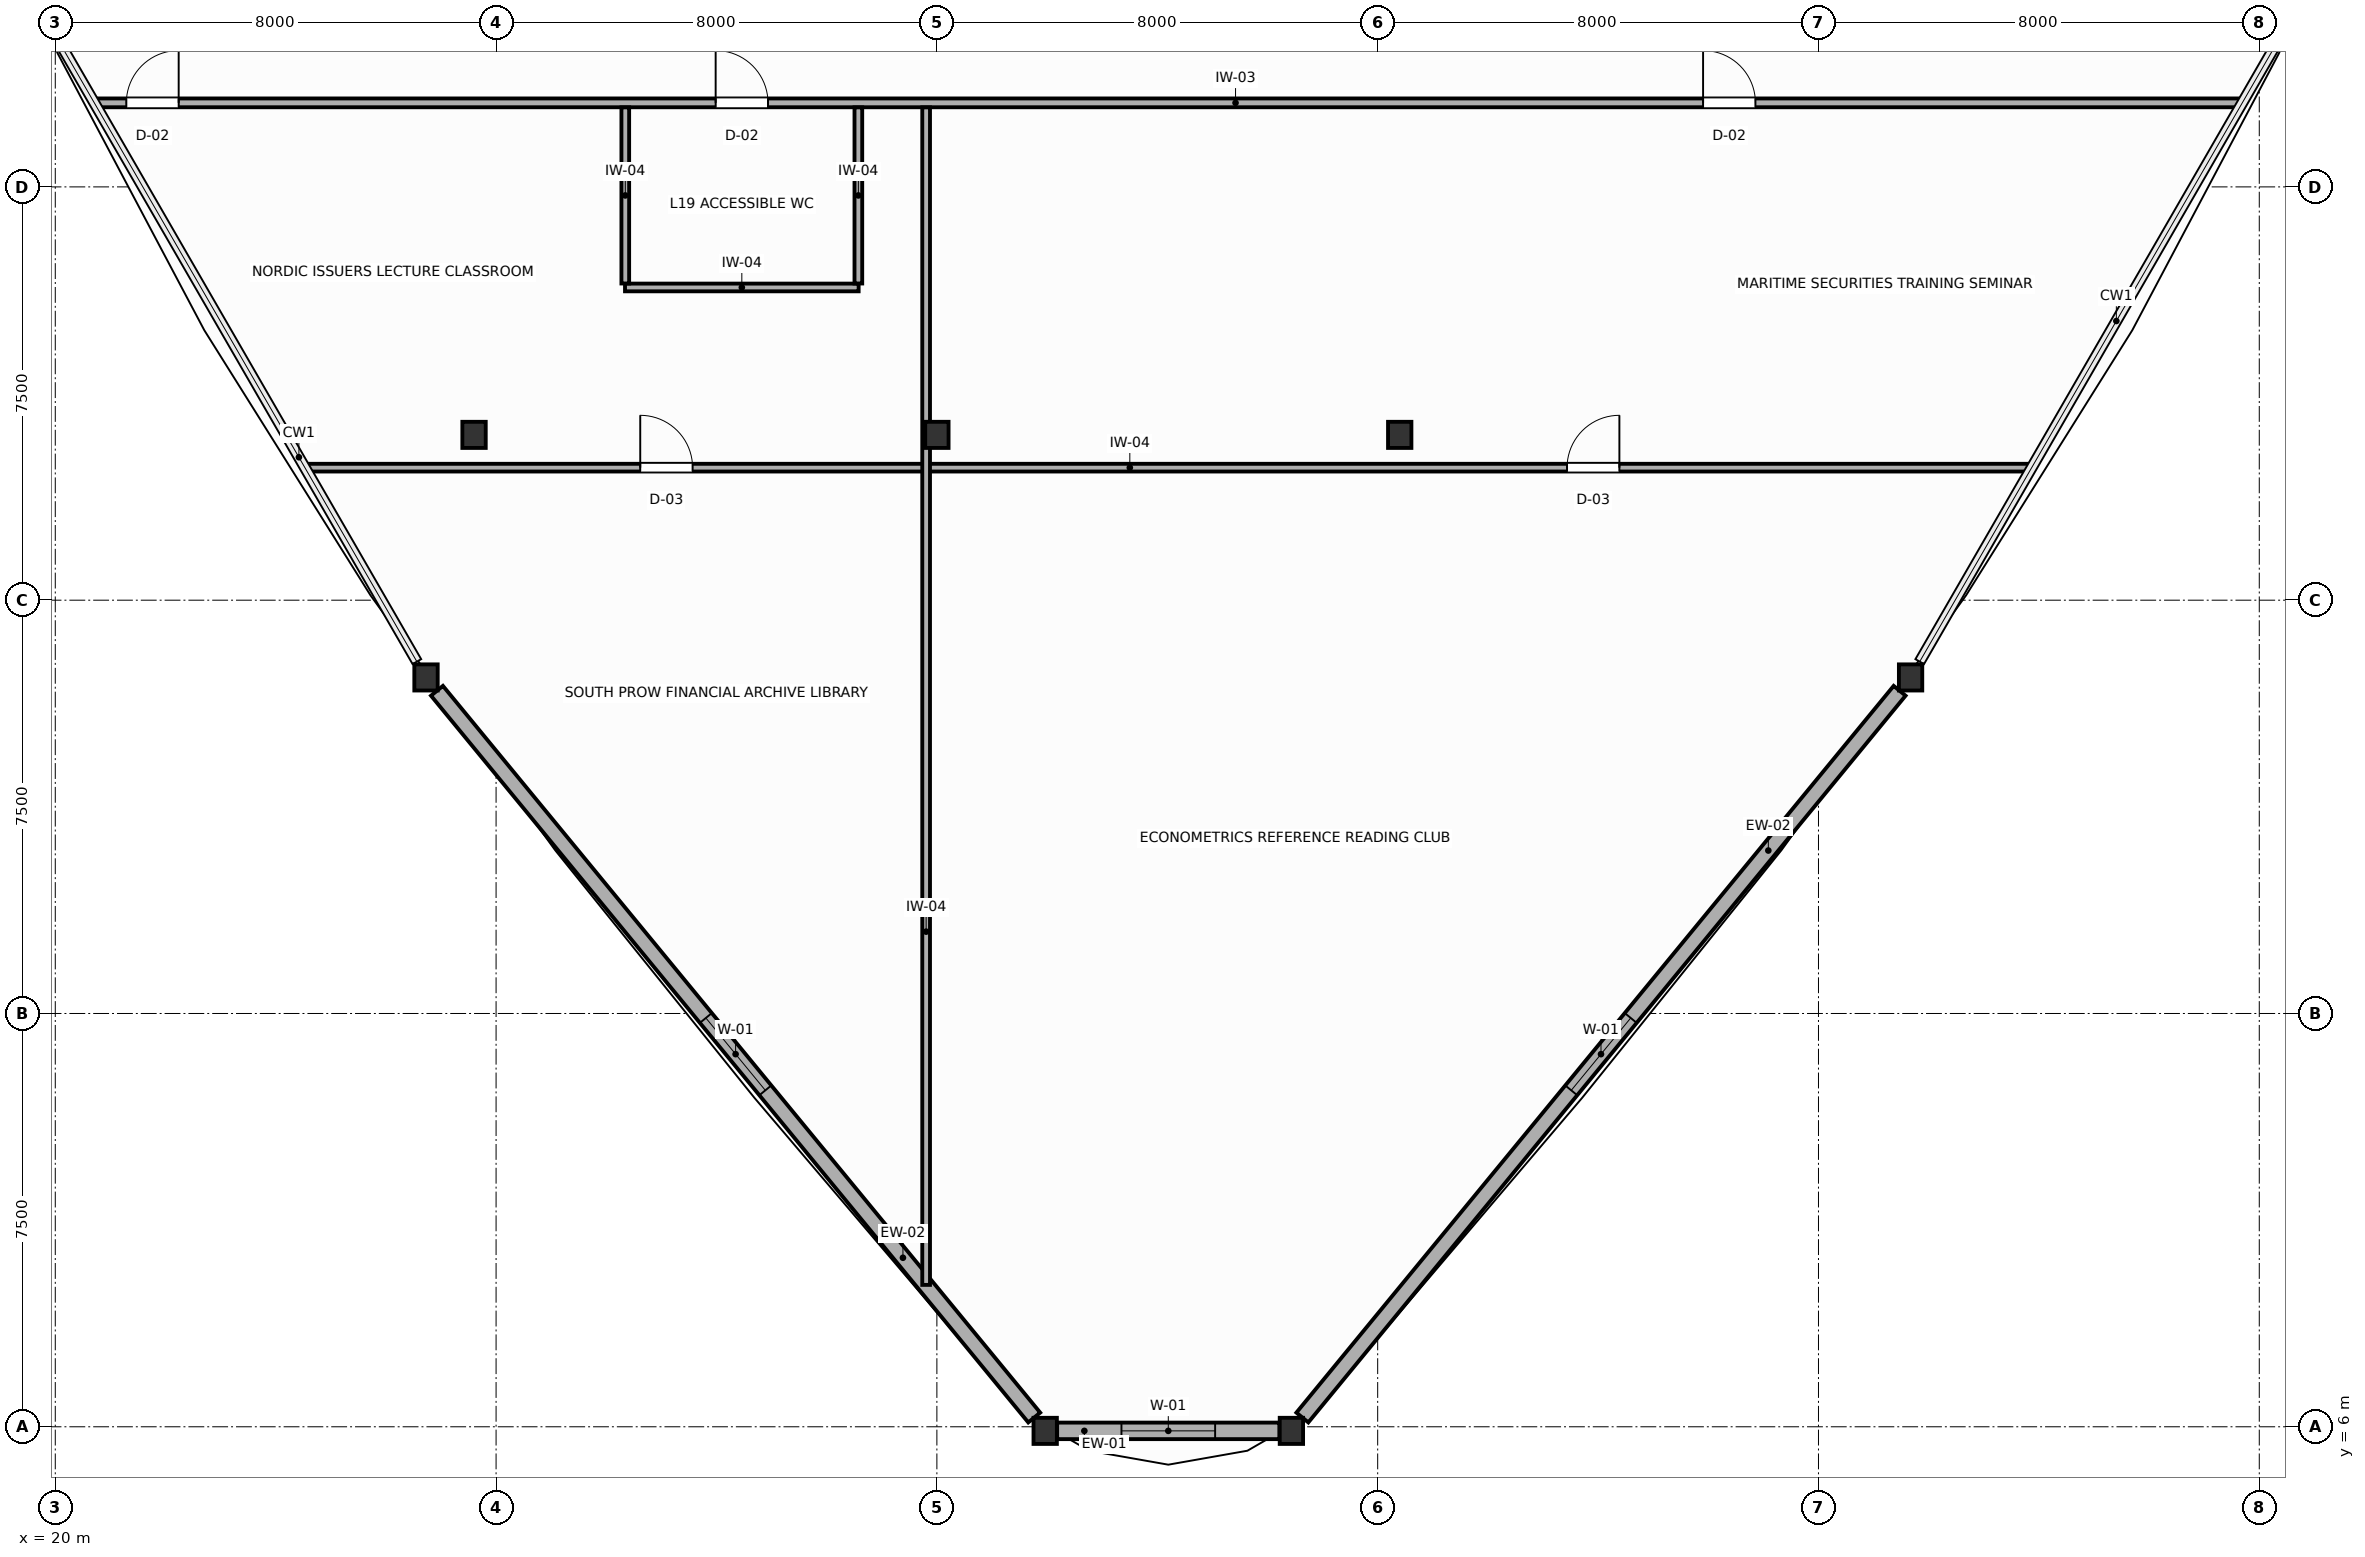
"""IFC4 building model, lengths in metres.
Left out: names, types, materials, properties, quantities, classifications, styles, units other than length and angle.
Written with IfcOpenShell. Run it as: python <this file> out.ifc"""

import sys

from ifc_helpers import new_model, si_unit, direction, frame, frame_2d, origin, origin_2d, place, context, subcontext, project, spatial, rectangle, i_section, extrude, source, transform, mapped, element, fill, save


model = new_model("IFC4")
c1 = context("Model", 3, precision=1e-05, world=origin(), true_north=direction((0.0, 1.0)))
c2 = subcontext(c1, "Body", "Model", "MODEL_VIEW")
j1 = project(units=[si_unit("LENGTHUNIT", "METRE"), si_unit("PLANEANGLEUNIT", "RADIAN")], contexts=[c1])
p1 = place(None, origin())
s1 = spatial("IfcSite", under=j1, at=p1, CompositionType="ELEMENT")
p2 = place(p1, origin())
s2 = spatial("IfcBuilding", under=s1, at=p2, CompositionType="ELEMENT")
p3 = place(p2, frame((0.0, 0.0, 79.5)))
s3 = spatial("IfcBuildingStorey", under=s2, at=p3, CompositionType="ELEMENT", Elevation=79.5)
m1 = source(origin(), c2, "Body", "SweptSolid", [
    extrude(i_section(OverallWidth=0.424, OverallDepth=0.474, WebThickness=0.045, FlangeThickness=0.072, FilletRadius=0.015, at=origin_2d()), origin(), (0.0, 0.0, 1.0), 3.9),
])
for number, where, z_axis, x_axis in (
    (1, (27.6, 24.0, 0.0), (0.0, 0.0, 1.0), (1.0, 0.0, 0.0)),
    (2, (44.4, 24.0, 0.0), (0.0, 0.0, 1.0), (1.0, 0.0, 0.0)),
    (3, (36.0, 24.0, 0.0), (0.0, 0.0, 1.0), (1.0, 0.0, 0.0)),
    (4, (26.729, 19.598, 0.0), (0.0, 0.0, 1.0), (1.0, 0.0, 0.0)),
    (5, (37.966, 5.926, 0.0), (0.0, 0.0, 1.0), (1.0, 0.0, 0.0)),
    (6, (42.434, 5.926, 0.0), (0.0, 0.0, 1.0), (1.0, 0.0, 0.0)),
    (7, (53.672, 19.598, 0.0), (0.0, 0.0, 1.0), (1.0, 0.0, 0.0)),
):
    element("IfcColumn", number, at=place(p3, frame(where, z_axis=z_axis, x_axis=x_axis)), inside=s3, PredefinedType="COLUMN", context=c2, shape_type="MappedRepresentation", body=[
        mapped(m1, transform((0.0, 0.0, 0.0), scale=1.0)),
    ])
p4 = place(p3, frame((26.927, 19.356, 0.0), z_axis=(0.0, 0.0, 1.0), x_axis=(0.634956540438, -0.772547857259, 0.0)))
e8 = element("IfcWall", 8, at=p4, inside=s3, PredefinedType="SOLIDWALL", context=c2, shape_type="SweptSolid", body=[
    extrude(rectangle(XDim=17.071, YDim=0.28, at=frame_2d((8.536, 0.0))), origin(), (0.0, 0.0, 1.0), 3.23),
])
p5 = place(p4, frame((7.686, 0.0, 0.75)))
e9 = element("IfcOpeningElement", 9, at=p5, cuts=e8, PredefinedType="OPENING", context=c2, shape_type="SweptSolid", body=[
    extrude(rectangle(XDim=1.7, YDim=1.75, at=frame_2d((0.85, 0.875))), frame((0.0, 0.15, 0.0), z_axis=(0.0, -1.0, 0.0), x_axis=(1.0, 0.0, 0.0)), (0.0, 0.0, 1.0), 0.3),
])
p6 = place(p3, frame((38.183, 5.926, 0.0), z_axis=(0.0, 0.0, 1.0), x_axis=(1.0, 0.0, 0.0)))
e10 = element("IfcWall", 10, at=p6, inside=s3, PredefinedType="SOLIDWALL", context=c2, shape_type="SweptSolid", body=[
    extrude(rectangle(XDim=4.034, YDim=0.3, at=frame_2d((2.017, 0.0))), origin(), (0.0, 0.0, 1.0), 3.23),
])
p7 = place(p6, frame((1.167, 0.0, 0.75)))
e11 = element("IfcOpeningElement", 11, at=p7, cuts=e10, PredefinedType="OPENING", context=c2, shape_type="SweptSolid", body=[
    extrude(rectangle(XDim=1.7, YDim=1.75, at=frame_2d((0.85, 0.875))), frame((0.0, 0.16, 0.0), z_axis=(0.0, -1.0, 0.0), x_axis=(1.0, 0.0, 0.0)), (0.0, 0.0, 1.0), 0.32),
])
p8 = place(p3, frame((42.633, 6.168, 0.0), z_axis=(0.0, 0.0, 1.0), x_axis=(0.634956540438, 0.772547857259, 0.0)))
e12 = element("IfcWall", 12, at=p8, inside=s3, PredefinedType="SOLIDWALL", context=c2, shape_type="SweptSolid", body=[
    extrude(rectangle(XDim=17.071, YDim=0.28, at=frame_2d((8.536, 0.0))), origin(), (0.0, 0.0, 1.0), 3.23),
])
p9 = place(p8, frame((7.686, 0.0, 0.75)))
e13 = element("IfcOpeningElement", 13, at=p9, cuts=e12, PredefinedType="OPENING", context=c2, shape_type="SweptSolid", body=[
    extrude(rectangle(XDim=1.7, YDim=1.75, at=frame_2d((0.85, 0.875))), frame((0.0, 0.15, 0.0), z_axis=(0.0, -1.0, 0.0), x_axis=(1.0, 0.0, 0.0)), (0.0, 0.0, 1.0), 0.3),
])
p10 = place(p3, frame((20.729, 30.025, 0.0), z_axis=(0.0, 0.0, 1.0), x_axis=(1.0, 0.0, 0.0)))
e14 = element("IfcWall", 14, at=p10, inside=s3, PredefinedType="PARTITIONING", context=c2, shape_type="SweptSolid", body=[
    extrude(rectangle(XDim=38.943, YDim=0.16, at=frame_2d((19.472, 0.0))), origin(), (0.0, 0.0, 1.0), 3.68),
])
p11 = place(p10, frame((11.257, 0.0, 0.0)))
e15 = element("IfcOpeningElement", 15, at=p11, cuts=e14, PredefinedType="OPENING", context=c2, shape_type="SweptSolid", body=[
    extrude(rectangle(XDim=0.95, YDim=2.05, at=frame_2d((0.475, 1.025))), frame((0.0, 0.09, 0.0), z_axis=(0.0, -1.0, 0.0), x_axis=(1.0, 0.0, 0.0)), (0.0, 0.0, 1.0), 0.18),
])
p12 = place(p10, frame((0.561, 0.0, 0.0)))
e16 = element("IfcOpeningElement", 16, at=p12, cuts=e14, PredefinedType="OPENING", context=c2, shape_type="SweptSolid", body=[
    extrude(rectangle(XDim=0.95, YDim=2.05, at=frame_2d((0.475, 1.025))), frame((0.0, 0.09, 0.0), z_axis=(0.0, -1.0, 0.0), x_axis=(1.0, 0.0, 0.0)), (0.0, 0.0, 1.0), 0.18),
])
p13 = place(p10, frame((29.177, 0.0, 0.0)))
e17 = element("IfcOpeningElement", 17, at=p13, cuts=e14, PredefinedType="OPENING", context=c2, shape_type="SweptSolid", body=[
    extrude(rectangle(XDim=0.95, YDim=2.05, at=frame_2d((0.475, 1.025))), frame((0.0, 0.09, 0.0), z_axis=(0.0, -1.0, 0.0), x_axis=(1.0, 0.0, 0.0)), (0.0, 0.0, 1.0), 0.18),
])
p14 = place(p3, frame((24.551, 23.405, 0.0), z_axis=(0.0, 0.0, 1.0), x_axis=(1.0, 0.0, 0.0)))
e18 = element("IfcWall", 18, at=p14, inside=s3, PredefinedType="PARTITIONING", context=c2, shape_type="SweptSolid", body=[
    extrude(rectangle(XDim=31.299, YDim=0.14, at=frame_2d((15.649, 0.0))), origin(), (0.0, 0.0, 1.0), 3.68),
])
p15 = place(p14, frame((6.066, 0.0, 0.0)))
e19 = element("IfcOpeningElement", 19, at=p15, cuts=e18, PredefinedType="OPENING", context=c2, shape_type="SweptSolid", body=[
    extrude(rectangle(XDim=0.95, YDim=2.05, at=frame_2d((0.475, 1.025))), frame((0.0, 0.08, 0.0), z_axis=(0.0, -1.0, 0.0), x_axis=(1.0, 0.0, 0.0)), (0.0, 0.0, 1.0), 0.16),
])
p16 = place(p14, frame((22.886, 0.0, 0.0)))
e20 = element("IfcOpeningElement", 20, at=p16, cuts=e18, PredefinedType="OPENING", context=c2, shape_type="SweptSolid", body=[
    extrude(rectangle(XDim=0.95, YDim=2.05, at=frame_2d((0.475, 1.025))), frame((0.0, 0.08, 0.0), z_axis=(0.0, -1.0, 0.0), x_axis=(1.0, 0.0, 0.0)), (0.0, 0.0, 1.0), 0.16),
])
p17 = place(p3, frame((35.805, 8.575, 0.0), z_axis=(0.0, 0.0, 1.0), x_axis=(0.0, 1.0, 0.0)))
e21 = element("IfcWall", 21, at=p17, inside=s3, PredefinedType="PARTITIONING", context=c2, shape_type="SweptSolid", body=[
    extrude(rectangle(XDim=21.368, YDim=0.14, at=frame_2d((10.684, 0.0))), origin(), (0.0, 0.0, 1.0), 3.18),
])
p18 = place(p3, frame((30.34, 26.675, 0.0), z_axis=(0.0, 0.0, 1.0), x_axis=(1.0, 0.0, 0.0)))
e22 = element("IfcWall", 22, at=p18, inside=s3, PredefinedType="PARTITIONING", context=c2, shape_type="SweptSolid", body=[
    extrude(rectangle(XDim=4.24, YDim=0.14, at=frame_2d((2.12, 0.0))), origin(), (0.0, 0.0, 1.0), 3.68),
])
for number, where, z_axis, x_axis in (
    (23, (34.575, 26.747, 0.0), (0.0, 0.0, 1.0), (0.0, 1.0, 0.0)),
    (24, (30.345, 26.747, 0.0), (0.0, 0.0, 1.0), (0.0, 1.0, 0.0)),
):
    element("IfcWall", number, at=place(p3, frame(where, z_axis=z_axis, x_axis=x_axis)), inside=s3, PredefinedType="PARTITIONING", context=c2, shape_type="SweptSolid", body=[
        extrude(rectangle(XDim=3.196, YDim=0.14, at=frame_2d((1.598, 0.0))), origin(), (0.0, 0.0, 1.0), 3.68),
    ])
p19 = place(p5, origin())
e25 = element("IfcWindow", 25, at=p19, inside=s3, PartitioningType="SINGLE_PANEL", PredefinedType="WINDOW", context=c2, shape_type="SweptSolid", body=[
    extrude(rectangle(XDim=1.7, YDim=1.75, at=frame_2d((0.85, 0.875))), frame((0.0, 0.03, 0.0), z_axis=(0.0, -1.0, 0.0), x_axis=(1.0, 0.0, 0.0)), (0.0, 0.0, 1.0), 0.06),
])
fill(e9, e25)
p20 = place(p7, origin())
e26 = element("IfcWindow", 26, at=p20, inside=s3, PartitioningType="SINGLE_PANEL", PredefinedType="WINDOW", context=c2, shape_type="SweptSolid", body=[
    extrude(rectangle(XDim=1.7, YDim=1.75, at=frame_2d((0.85, 0.875))), frame((0.0, 0.03, 0.0), z_axis=(0.0, -1.0, 0.0), x_axis=(1.0, 0.0, 0.0)), (0.0, 0.0, 1.0), 0.06),
])
fill(e11, e26)
p21 = place(p9, origin())
e27 = element("IfcWindow", 27, at=p21, inside=s3, PartitioningType="SINGLE_PANEL", PredefinedType="WINDOW", context=c2, shape_type="SweptSolid", body=[
    extrude(rectangle(XDim=1.7, YDim=1.75, at=frame_2d((0.85, 0.875))), frame((0.0, 0.03, 0.0), z_axis=(0.0, -1.0, 0.0), x_axis=(1.0, 0.0, 0.0)), (0.0, 0.0, 1.0), 0.06),
])
fill(e13, e27)
p22 = place(p11, origin())
e28 = element("IfcDoor", 28, at=p22, inside=s3, OperationType="SINGLE_SWING_LEFT", PredefinedType="DOOR", context=c2, shape_type="SweptSolid", body=[
    extrude(rectangle(XDim=0.95, YDim=2.05, at=frame_2d((0.475, 1.025))), frame((0.0, 0.025, 0.0), z_axis=(0.0, -1.0, 0.0), x_axis=(1.0, 0.0, 0.0)), (0.0, 0.0, 1.0), 0.05),
])
fill(e15, e28)
p23 = place(p12, origin())
e29 = element("IfcDoor", 29, at=p23, inside=s3, OperationType="SINGLE_SWING_RIGHT", PredefinedType="DOOR", context=c2, shape_type="SweptSolid", body=[
    extrude(rectangle(XDim=0.95, YDim=2.05, at=frame_2d((0.475, 1.025))), frame((0.0, 0.025, 0.0), z_axis=(0.0, -1.0, 0.0), x_axis=(1.0, 0.0, 0.0)), (0.0, 0.0, 1.0), 0.05),
])
fill(e16, e29)
p24 = place(p13, origin())
e30 = element("IfcDoor", 30, at=p24, inside=s3, OperationType="SINGLE_SWING_LEFT", PredefinedType="DOOR", context=c2, shape_type="SweptSolid", body=[
    extrude(rectangle(XDim=0.95, YDim=2.05, at=frame_2d((0.475, 1.025))), frame((0.0, 0.025, 0.0), z_axis=(0.0, -1.0, 0.0), x_axis=(1.0, 0.0, 0.0)), (0.0, 0.0, 1.0), 0.05),
])
fill(e17, e30)
p25 = place(p15, origin())
e31 = element("IfcDoor", 31, at=p25, inside=s3, OperationType="SINGLE_SWING_LEFT", PredefinedType="DOOR", context=c2, shape_type="SweptSolid", body=[
    extrude(rectangle(XDim=0.95, YDim=2.05, at=frame_2d((0.475, 1.025))), frame((0.0, 0.025, 0.0), z_axis=(0.0, -1.0, 0.0), x_axis=(1.0, 0.0, 0.0)), (0.0, 0.0, 1.0), 0.05),
])
fill(e19, e31)
p26 = place(p16, origin())
e32 = element("IfcDoor", 32, at=p26, inside=s3, OperationType="SINGLE_SWING_RIGHT", PredefinedType="DOOR", context=c2, shape_type="SweptSolid", body=[
    extrude(rectangle(XDim=0.95, YDim=2.05, at=frame_2d((0.475, 1.025))), frame((0.0, 0.025, 0.0), z_axis=(0.0, -1.0, 0.0), x_axis=(1.0, 0.0, 0.0)), (0.0, 0.0, 1.0), 0.05),
])
fill(e20, e32)
save(model, sys.argv[1])
